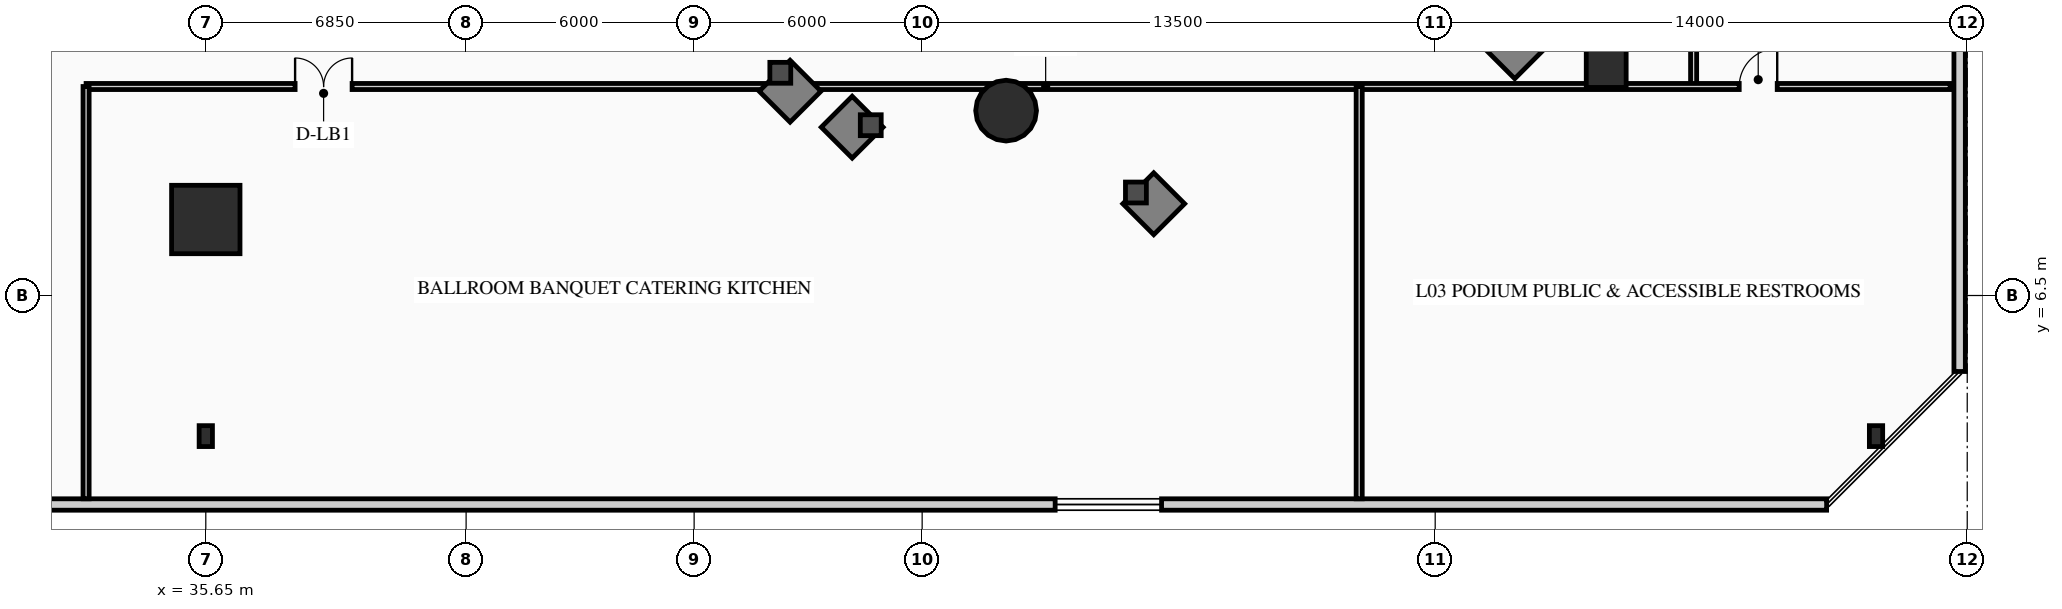
"""IFC4 building model, lengths in metres.
Left out: names, types, materials, properties, quantities, classifications, styles, units other than length and angle.
Written with IfcOpenShell. Run it as: python <this file> out.ifc"""

import sys

from ifc_helpers import new_model, si_unit, direction, frame, frame_2d, origin, origin_2d, place, context, subcontext, project, spatial, rectangle, hollow_rectangle, circle, extrude, source, transform, mapped, element, fill, save


model = new_model("IFC4")
c1 = context("Model", 3, precision=1e-05, world=origin(), true_north=direction((0.0, 1.0)))
c2 = subcontext(c1, "Body", "Model", "MODEL_VIEW")
j1 = project(units=[si_unit("LENGTHUNIT", "METRE"), si_unit("PLANEANGLEUNIT", "RADIAN")], contexts=[c1])
p1 = place(None, origin())
s1 = spatial("IfcSite", under=j1, at=p1, CompositionType="ELEMENT")
p2 = place(p1, origin())
s2 = spatial("IfcBuilding", under=s1, at=p2, CompositionType="ELEMENT")
p3 = place(p2, frame((0.0, 0.0, 13.2)))
s3 = spatial("IfcBuildingStorey", under=s2, at=p3, CompositionType="ELEMENT", Elevation=13.2)
p4 = place(p3, frame((56.709, 11.365, 0.0), z_axis=(0.0, 0.0, 1.0), x_axis=(1.0, 0.0, 0.0)))
e1 = element("IfcColumn", 1, at=p4, inside=s3, PredefinedType="USERDEFINED", context=c2, shape_type="SweptSolid", body=[
    extrude(circle(Radius=0.8, at=origin_2d()), origin(), (0.0, 0.0, 1.0), 4.2),
])
p5 = place(p3, frame((35.65, 8.5, 0.0), z_axis=(0.0, 0.0, 1.0), x_axis=(1.0, 0.0, 0.0)))
e2 = element("IfcColumn", 2, at=p5, inside=s3, PredefinedType="USERDEFINED", context=c2, shape_type="SweptSolid", body=[
    extrude(rectangle(XDim=1.8, YDim=1.8, at=origin_2d()), origin(), (0.0, 0.0, 1.0), 4.2),
])
for number, where, z_axis, x_axis in (
    (3, (35.65, 2.8, 0.0), (0.0, 0.0, 1.0), (1.0, 0.0, 0.0)),
    (4, (79.6, 2.8, 0.0), (0.0, 0.0, 1.0), (1.0, 0.0, 0.0)),
):
    element("IfcColumn", number, at=place(p3, frame(where, z_axis=z_axis, x_axis=x_axis)), inside=s3, PredefinedType="PILASTER", context=c2, shape_type="SweptSolid", body=[
        extrude(hollow_rectangle(XDim=0.35, YDim=0.55, WallThickness=0.022, at=origin_2d()), origin(), (0.0, 0.0, 1.0), 4.2),
    ])
p6 = place(p3, frame((72.5, 12.5, 0.0), z_axis=(0.0, 0.0, 1.0), x_axis=(1.0, 0.0, 0.0)))
e5 = element("IfcColumn", 5, at=p6, inside=s3, PredefinedType="COLUMN", context=c2, shape_type="SweptSolid", body=[
    extrude(rectangle(XDim=1.05, YDim=1.05, at=origin_2d()), origin(), (0.0, 0.0, 1.0), 4.2),
])
p7 = place(p3, frame((81.8, 44.5, 0.0), z_axis=(0.0, 0.0, 1.0), x_axis=(0.0, -1.0, 0.0)))
e6 = element("IfcWall", 6, at=p7, inside=s3, PredefinedType="SOLIDWALL", context=c2, shape_type="SweptSolid", body=[
    extrude(rectangle(XDim=40.0, YDim=0.3, at=frame_2d((20.0, 0.0))), origin(), (0.0, 0.0, 1.0), 3.8),
])
m1 = source(origin(), c2, "Body", "SweptSolid", [
    extrude(rectangle(XDim=2.8, YDim=2.1, at=frame_2d((1.4, 1.05))), frame((0.0, 0.16, 0.0), z_axis=(0.0, -1.0, 0.0), x_axis=(1.0, 0.0, 0.0)), (0.0, 0.0, 1.0), 0.32),
])
p8 = place(p7, frame((6.5, 0.0, 0.8)))
e7 = element("IfcOpeningElement", 7, at=p8, cuts=e6, PredefinedType="OPENING", context=c2, shape_type="MappedRepresentation", body=[
    mapped(m1, transform((0.0, 0.0, 0.0), x_axis=(1.0, 0.0, 0.0), y_axis=(0.0, 1.0, 0.0), z_axis=(0.0, 0.0, 1.0), scale=1.0)),
])
p9 = place(p3, frame((78.3, 1.0, 0.0), z_axis=(0.0, 0.0, 1.0), x_axis=(-1.0, 0.0, 0.0)))
e8 = element("IfcWall", 8, at=p9, inside=s3, PredefinedType="SOLIDWALL", context=c2, shape_type="SweptSolid", body=[
    extrude(rectangle(XDim=74.5, YDim=0.3, at=frame_2d((37.25, 0.0))), origin(), (0.0, 0.0, 1.0), 3.8),
])
p10 = place(p9, frame((17.5, 0.0, 0.8)))
e9 = element("IfcOpeningElement", 9, at=p10, cuts=e8, PredefinedType="OPENING", context=c2, shape_type="MappedRepresentation", body=[
    mapped(m1, transform((0.0, 0.0, 0.0), x_axis=(1.0, 0.0, 0.0), y_axis=(0.0, 1.0, 0.0), z_axis=(0.0, 0.0, 1.0), scale=1.0)),
])
p11 = place(p3, frame((74.8, 12.0, 0.0), z_axis=(0.0, 0.0, 1.0), x_axis=(0.0, 1.0, 0.0)))
e10 = element("IfcWall", 10, at=p11, inside=s3, PredefinedType="PARTITIONING", context=c2, shape_type="SweptSolid", body=[
    extrude(rectangle(XDim=35.75, YDim=0.16, at=frame_2d((17.875, 0.0))), origin(), (0.0, 0.0, 1.0), 2.844),
])
m2 = source(origin(), c2, "Body", "SweptSolid", [
    extrude(rectangle(XDim=1.5, YDim=2.02, at=frame_2d((0.75, 1.01))), frame((0.0, 0.09, 0.0), z_axis=(0.0, -1.0, 0.0), x_axis=(1.0, 0.0, 0.0)), (0.0, 0.0, 1.0), 0.18),
])
p12 = place(p11, frame((14.0, 0.0, 0.0)))
e11 = element("IfcOpeningElement", 11, at=p12, cuts=e10, PredefinedType="OPENING", context=c2, shape_type="MappedRepresentation", body=[
    mapped(m2, transform((0.0, 0.0, 0.0), x_axis=(1.0, 0.0, 0.0), y_axis=(0.0, 1.0, 0.0), z_axis=(0.0, 0.0, 1.0), scale=1.0)),
])
p13 = place(p3, frame((32.5, 12.0, 0.0), z_axis=(0.0, 0.0, 1.0), x_axis=(1.0, 0.0, 0.0)))
e12 = element("IfcWall", 12, at=p13, inside=s3, PredefinedType="PARTITIONING", context=c2, shape_type="SweptSolid", body=[
    extrude(rectangle(XDim=49.05, YDim=0.16, at=frame_2d((24.525, 0.0))), origin(), (0.0, 0.0, 1.0), 2.844),
])
p14 = place(p13, frame((5.5, 0.0, 0.0)))
e13 = element("IfcOpeningElement", 13, at=p14, cuts=e12, PredefinedType="OPENING", context=c2, shape_type="MappedRepresentation", body=[
    mapped(m2, transform((0.0, 0.0, 0.0), x_axis=(1.0, 0.0, 0.0), y_axis=(0.0, 1.0, 0.0), z_axis=(0.0, 0.0, 1.0), scale=1.0)),
])
m3 = source(origin(), c2, "Body", "SweptSolid", [
    extrude(rectangle(XDim=1.0, YDim=2.015, at=frame_2d((0.5, 1.007))), frame((0.0, 0.09, 0.0), z_axis=(0.0, -1.0, 0.0), x_axis=(1.0, 0.0, 0.0)), (0.0, 0.0, 1.0), 0.18),
])
p15 = place(p13, frame((43.5, 0.0, 0.0)))
e14 = element("IfcOpeningElement", 14, at=p15, cuts=e12, PredefinedType="OPENING", context=c2, shape_type="MappedRepresentation", body=[
    mapped(m3, transform((0.0, 0.0, 0.0), x_axis=(1.0, 0.0, 0.0), y_axis=(0.0, 1.0, 0.0), z_axis=(0.0, 0.0, 1.0), scale=1.0)),
])
p16 = place(p3, frame((32.5, 1.15, 0.0), z_axis=(0.0, 0.0, 1.0), x_axis=(0.0, 1.0, 0.0)))
e15 = element("IfcWall", 15, at=p16, inside=s3, PredefinedType="PARTITIONING", context=c2, shape_type="SweptSolid", body=[
    extrude(rectangle(XDim=10.85, YDim=0.16, at=frame_2d((5.425, 0.0))), origin(), (0.0, 0.0, 1.0), 2.839),
])
p17 = place(p3, frame((66.0, 1.15, 0.0), z_axis=(0.0, 0.0, 1.0), x_axis=(0.0, 1.0, 0.0)))
e16 = element("IfcWall", 16, at=p17, inside=s3, PredefinedType="PARTITIONING", context=c2, shape_type="SweptSolid", body=[
    extrude(rectangle(XDim=10.85, YDim=0.16, at=frame_2d((5.425, 0.0))), origin(), (0.0, 0.0, 1.0), 2.844),
])
m4 = source(origin(), c2, "Body", "SweptSolid", [
    extrude(rectangle(XDim=2.8, YDim=2.1, at=frame_2d((1.4, 1.05))), frame((0.0, 0.03, 0.0), z_axis=(0.0, -1.0, 0.0), x_axis=(1.0, 0.0, 0.0)), (0.0, 0.0, 1.0), 0.06),
])
p18 = place(p10, origin())
e17 = element("IfcWindow", 17, at=p18, inside=s3, PartitioningType="TRIPLE_PANEL_VERTICAL", PredefinedType="WINDOW", context=c2, shape_type="MappedRepresentation", body=[
    mapped(m4, transform((0.0, 0.0, 0.0), x_axis=(1.0, 0.0, 0.0), y_axis=(0.0, 1.0, 0.0), z_axis=(0.0, 0.0, 1.0), scale=1.0)),
])
fill(e9, e17)
m5 = source(origin(), c2, "Body", "SweptSolid", [
    extrude(rectangle(XDim=1.5, YDim=2.02, at=frame_2d((0.75, 1.01))), frame((0.0, 0.025, 0.0), z_axis=(0.0, -1.0, 0.0), x_axis=(1.0, 0.0, 0.0)), (0.0, 0.0, 1.0), 0.05),
])
p19 = place(p14, origin())
e18 = element("IfcDoor", 18, at=p19, inside=s3, OperationType="DOUBLE_DOOR_SINGLE_SWING", PredefinedType="DOOR", context=c2, shape_type="MappedRepresentation", body=[
    mapped(m5, transform((0.0, 0.0, 0.0), x_axis=(1.0, 0.0, 0.0), y_axis=(0.0, 1.0, 0.0), z_axis=(0.0, 0.0, 1.0), scale=1.0)),
])
fill(e13, e18)
m6 = source(origin(), c2, "Body", "SweptSolid", [
    extrude(rectangle(XDim=1.0, YDim=2.015, at=frame_2d((0.5, 1.007))), frame((0.0, 0.025, 0.0), z_axis=(0.0, -1.0, 0.0), x_axis=(1.0, 0.0, 0.0)), (0.0, 0.0, 1.0), 0.05),
])
p20 = place(p15, origin())
e19 = element("IfcDoor", 19, at=p20, inside=s3, OperationType="SINGLE_SWING_RIGHT", PredefinedType="DOOR", context=c2, shape_type="MappedRepresentation", body=[
    mapped(m6, transform((0.0, 0.0, 0.0), x_axis=(1.0, 0.0, 0.0), y_axis=(0.0, 1.0, 0.0), z_axis=(0.0, 0.0, 1.0), scale=1.0)),
])
fill(e14, e19)
save(model, sys.argv[1])
